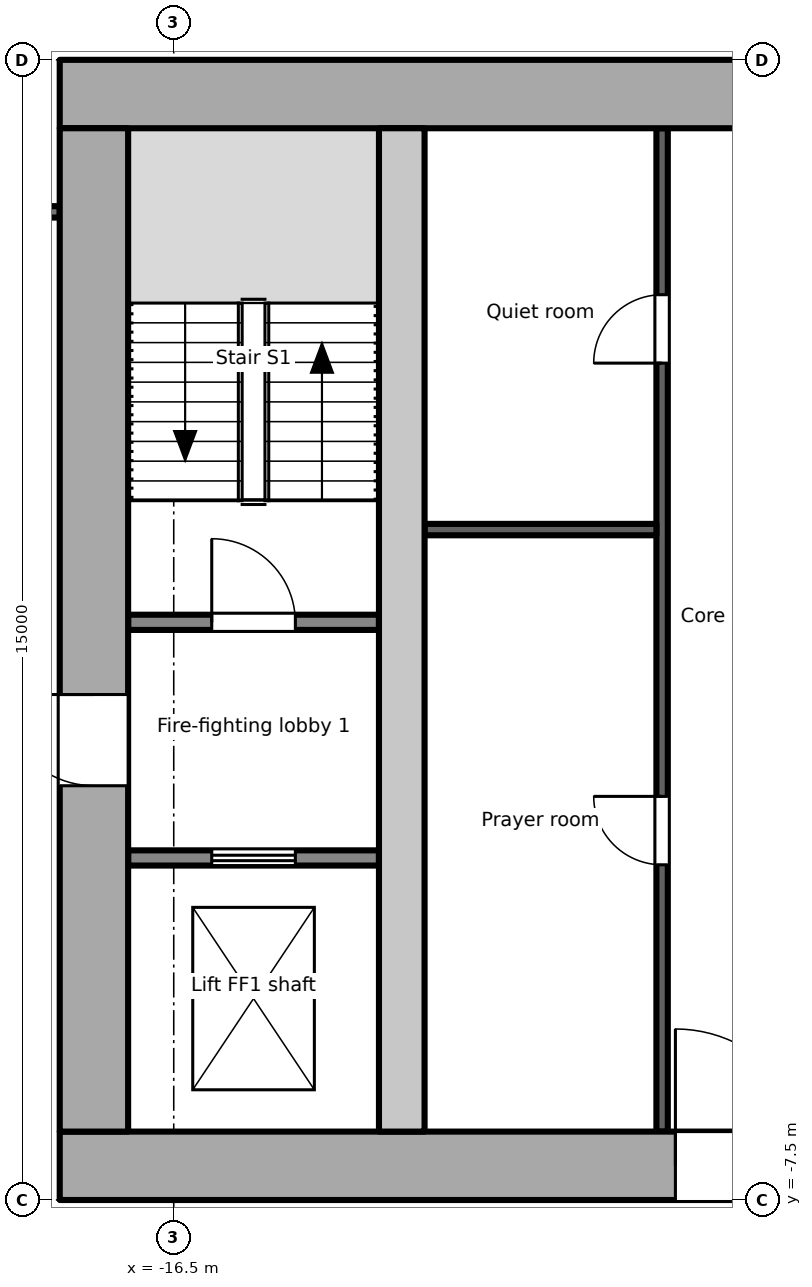
"""IFC4 building model, lengths in metres.
Left out: names, types, materials, properties, quantities, classifications, styles, units other than length and angle.
Written with IfcOpenShell. Run it as: python <this file> out.ifc"""

import sys

from ifc_helpers import new_model, si_unit, direction, frame, frame_2d, origin, place, context, subcontext, project, spatial, rectangle, extrude, element, fill, save


model = new_model("IFC4")
c1 = context("Model", 3, precision=1e-05, world=origin(), true_north=direction((0.0, 1.0)))
c2 = subcontext(c1, "Body", "Model", "MODEL_VIEW")
j1 = project(units=[si_unit("LENGTHUNIT", "METRE"), si_unit("PLANEANGLEUNIT", "RADIAN")], contexts=[c1])
p1 = place(None, origin())
s1 = spatial("IfcSite", under=j1, at=p1, CompositionType="ELEMENT")
p2 = place(p1, origin())
s2 = spatial("IfcBuilding", under=s1, at=p2, CompositionType="ELEMENT")
p3 = place(p2, frame((0.0, 0.0, 282.4)))
s3 = spatial("IfcBuildingStorey", under=s2, at=p3, CompositionType="ELEMENT", Elevation=282.4)
p4 = place(p3, frame((-18.0, -7.05, -0.2), z_axis=(0.0, 0.0, 1.0), x_axis=(1.0, 0.0, 0.0)))
e1 = element("IfcWall", 1, at=p4, inside=s3, PredefinedType="SHEAR", context=c2, shape_type="SweptSolid", body=[
    extrude(rectangle(XDim=36.0, YDim=0.9, at=frame_2d((18.0, 0.0))), origin(), (0.0, 0.0, 1.0), 3.9),
])
p5 = place(p4, frame((8.1, 0.0, 0.2)))
e2 = element("IfcOpeningElement", 2, at=p5, cuts=e1, PredefinedType="OPENING", context=c2, shape_type="SweptSolid", body=[
    extrude(rectangle(XDim=1.8, YDim=2.1, at=frame_2d((0.9, 1.05))), frame((0.0, 0.46, 0.0), z_axis=(0.0, -1.0, 0.0), x_axis=(1.0, 0.0, 0.0)), (0.0, 0.0, 1.0), 0.921),
])
p6 = place(p4, frame((16.8, 0.0, 0.2)))
e3 = element("IfcOpeningElement", 3, at=p6, cuts=e1, PredefinedType="OPENING", context=c2, shape_type="SweptSolid", body=[
    extrude(rectangle(XDim=2.4, YDim=2.1, at=frame_2d((1.2, 1.05))), frame((0.0, 0.46, 0.0), z_axis=(0.0, -1.0, 0.0), x_axis=(1.0, 0.0, 0.0)), (0.0, 0.0, 1.0), 0.921),
])
p7 = place(p4, frame((26.1, 0.0, 0.2)))
e4 = element("IfcOpeningElement", 4, at=p7, cuts=e1, PredefinedType="OPENING", context=c2, shape_type="SweptSolid", body=[
    extrude(rectangle(XDim=2.4, YDim=2.1, at=frame_2d((1.2, 1.05))), frame((0.0, 0.46, 0.0), z_axis=(0.0, -1.0, 0.0), x_axis=(1.0, 0.0, 0.0)), (0.0, 0.0, 1.0), 0.921),
])
p8 = place(p3, frame((-18.0, 7.05, -0.2), z_axis=(0.0, 0.0, 1.0), x_axis=(1.0, 0.0, 0.0)))
e5 = element("IfcWall", 5, at=p8, inside=s3, PredefinedType="SHEAR", context=c2, shape_type="SweptSolid", body=[
    extrude(rectangle(XDim=36.0, YDim=0.9, at=frame_2d((18.0, 0.0))), origin(), (0.0, 0.0, 1.0), 3.9),
])
p9 = place(p3, frame((-17.55, -6.6, -0.2), z_axis=(0.0, 0.0, 1.0), x_axis=(0.0, 1.0, 0.0)))
e6 = element("IfcWall", 6, at=p9, inside=s3, PredefinedType="SHEAR", context=c2, shape_type="SweptSolid", body=[
    extrude(rectangle(XDim=13.2, YDim=0.9, at=frame_2d((6.6, 0.0))), origin(), (0.0, 0.0, 1.0), 3.9),
])
p10 = place(p9, frame((4.55, 0.0, 0.2)))
e7 = element("IfcOpeningElement", 7, at=p10, cuts=e6, PredefinedType="OPENING", context=c2, shape_type="SweptSolid", body=[
    extrude(rectangle(XDim=1.2, YDim=2.1, at=frame_2d((0.6, 1.05))), frame((0.0, 0.46, 0.0), z_axis=(0.0, -1.0, 0.0), x_axis=(1.0, 0.0, 0.0)), (0.0, 0.0, 1.0), 0.921),
])
p11 = place(p3, frame((-13.5, -6.6, -0.2), z_axis=(0.0, 0.0, 1.0), x_axis=(0.0, 1.0, 0.0)))
e8 = element("IfcWall", 8, at=p11, inside=s3, PredefinedType="SHEAR", context=c2, shape_type="SweptSolid", body=[
    extrude(rectangle(XDim=13.2, YDim=0.6, at=frame_2d((6.6, 0.0))), origin(), (0.0, 0.0, 1.0), 3.9),
])
p12 = place(p3, frame((-17.1, -3.0, 0.0), z_axis=(0.0, 0.0, 1.0), x_axis=(1.0, 0.0, 0.0)))
e9 = element("IfcWall", 9, at=p12, inside=s3, PredefinedType="PARTITIONING", context=c2, shape_type="SweptSolid", body=[
    extrude(rectangle(XDim=3.3, YDim=0.2, at=frame_2d((1.65, 0.0))), origin(), (0.0, 0.0, 1.0), 3.7),
])
p13 = place(p12, frame((1.1, 0.0, 0.0)))
e10 = element("IfcOpeningElement", 10, at=p13, cuts=e9, PredefinedType="OPENING", context=c2, shape_type="SweptSolid", body=[
    extrude(rectangle(XDim=1.1, YDim=2.1, at=frame_2d((0.55, 1.05))), frame((0.0, 0.111, 0.0), z_axis=(0.0, -1.0, 0.0), x_axis=(1.0, 0.0, 0.0)), (0.0, 0.0, 1.0), 0.221),
])
p14 = place(p3, frame((-17.1, 0.1, 0.0), z_axis=(0.0, 0.0, 1.0), x_axis=(1.0, 0.0, 0.0)))
e11 = element("IfcWall", 11, at=p14, inside=s3, PredefinedType="PARTITIONING", context=c2, shape_type="SweptSolid", body=[
    extrude(rectangle(XDim=3.3, YDim=0.2, at=frame_2d((1.65, 0.0))), origin(), (0.0, 0.0, 1.0), 3.7),
])
p15 = place(p14, frame((1.1, 0.0, 0.0)))
e12 = element("IfcOpeningElement", 12, at=p15, cuts=e11, PredefinedType="OPENING", context=c2, shape_type="SweptSolid", body=[
    extrude(rectangle(XDim=1.1, YDim=2.1, at=frame_2d((0.55, 1.05))), frame((0.0, 0.111, 0.0), z_axis=(0.0, -1.0, 0.0), x_axis=(1.0, 0.0, 0.0)), (0.0, 0.0, 1.0), 0.221),
])
p16 = place(p3, frame((-10.075, -6.6, 0.0), z_axis=(0.0, 0.0, 1.0), x_axis=(0.0, 1.0, 0.0)))
e13 = element("IfcWall", 13, at=p16, inside=s3, PredefinedType="PARTITIONING", context=c2, shape_type="SweptSolid", body=[
    extrude(rectangle(XDim=13.2, YDim=0.15, at=frame_2d((6.6, 0.0))), origin(), (0.0, 0.0, 1.0), 3.7),
])
p17 = place(p16, frame((3.51, 0.0, 0.0)))
e14 = element("IfcOpeningElement", 14, at=p17, cuts=e13, PredefinedType="OPENING", context=c2, shape_type="SweptSolid", body=[
    extrude(rectangle(XDim=0.9, YDim=2.1, at=frame_2d((0.45, 1.05))), frame((0.0, 0.085, 0.0), z_axis=(0.0, -1.0, 0.0), x_axis=(1.0, 0.0, 0.0)), (0.0, 0.0, 1.0), 0.171),
])
p18 = place(p16, frame((10.11, 0.0, 0.0)))
e15 = element("IfcOpeningElement", 15, at=p18, cuts=e13, PredefinedType="OPENING", context=c2, shape_type="SweptSolid", body=[
    extrude(rectangle(XDim=0.9, YDim=2.1, at=frame_2d((0.45, 1.05))), frame((0.0, 0.085, 0.0), z_axis=(0.0, -1.0, 0.0), x_axis=(1.0, 0.0, 0.0)), (0.0, 0.0, 1.0), 0.171),
])
p19 = place(p3, frame((-13.2, 1.32, 0.0), z_axis=(0.0, 0.0, 1.0), x_axis=(1.0, 0.0, 0.0)))
e16 = element("IfcWall", 16, at=p19, inside=s3, PredefinedType="PARTITIONING", context=c2, shape_type="SweptSolid", body=[
    extrude(rectangle(XDim=3.05, YDim=0.15, at=frame_2d((1.525, 0.0))), origin(), (0.0, 0.0, 1.0), 3.7),
])
p20 = place(p3, frame((-20.925, 5.5, 0.0), z_axis=(0.0, 0.0, 1.0), x_axis=(1.0, 0.0, 0.0)))
e17 = element("IfcWall", 17, at=p20, inside=s3, PredefinedType="PARTITIONING", context=c2, shape_type="SweptSolid", body=[
    extrude(rectangle(XDim=2.925, YDim=0.15, at=frame_2d((1.462, 0.0))), origin(), (0.0, 0.0, 1.0), 3.7),
])
p21 = place(p13, origin())
e18 = element("IfcDoor", 18, at=p21, inside=s3, OperationType="DOUBLE_DOOR_SLIDING", PredefinedType="DOOR", context=c2, shape_type="SweptSolid", body=[
    extrude(rectangle(XDim=1.1, YDim=2.1, at=frame_2d((0.55, 1.05))), frame((0.0, 0.025, 0.0), z_axis=(0.0, -1.0, 0.0), x_axis=(1.0, 0.0, 0.0)), (0.0, 0.0, 1.0), 0.05),
])
fill(e10, e18)
p22 = place(p10, origin())
e19 = element("IfcDoor", 19, at=p22, inside=s3, OperationType="SINGLE_SWING_RIGHT", PredefinedType="DOOR", context=c2, shape_type="SweptSolid", body=[
    extrude(rectangle(XDim=1.2, YDim=2.1, at=frame_2d((0.6, 1.05))), frame((0.0, 0.025, 0.0), z_axis=(0.0, -1.0, 0.0), x_axis=(1.0, 0.0, 0.0)), (0.0, 0.0, 1.0), 0.05),
])
fill(e7, e19)
p23 = place(p15, origin())
e20 = element("IfcDoor", 20, at=p23, inside=s3, OperationType="SINGLE_SWING_LEFT", PredefinedType="DOOR", context=c2, shape_type="SweptSolid", body=[
    extrude(rectangle(XDim=1.1, YDim=2.1, at=frame_2d((0.55, 1.05))), frame((0.0, 0.025, 0.0), z_axis=(0.0, -1.0, 0.0), x_axis=(1.0, 0.0, 0.0)), (0.0, 0.0, 1.0), 0.05),
])
fill(e12, e20)
p24 = place(p17, origin())
e21 = element("IfcDoor", 21, at=p24, inside=s3, OperationType="SINGLE_SWING_RIGHT", PredefinedType="DOOR", context=c2, shape_type="SweptSolid", body=[
    extrude(rectangle(XDim=0.9, YDim=2.1, at=frame_2d((0.45, 1.05))), frame((0.0, 0.025, 0.0), z_axis=(0.0, -1.0, 0.0), x_axis=(1.0, 0.0, 0.0)), (0.0, 0.0, 1.0), 0.05),
])
fill(e14, e21)
p25 = place(p18, origin())
e22 = element("IfcDoor", 22, at=p25, inside=s3, OperationType="SINGLE_SWING_LEFT", PredefinedType="DOOR", context=c2, shape_type="SweptSolid", body=[
    extrude(rectangle(XDim=0.9, YDim=2.1, at=frame_2d((0.45, 1.05))), frame((0.0, 0.025, 0.0), z_axis=(0.0, -1.0, 0.0), x_axis=(1.0, 0.0, 0.0)), (0.0, 0.0, 1.0), 0.05),
])
fill(e15, e22)
p26 = place(p5, origin())
e23 = element("IfcDoor", 23, at=p26, inside=s3, OperationType="SINGLE_SWING_LEFT", PredefinedType="DOOR", context=c2, shape_type="SweptSolid", body=[
    extrude(rectangle(XDim=1.8, YDim=2.1, at=frame_2d((0.9, 1.05))), frame((0.0, 0.025, 0.0), z_axis=(0.0, -1.0, 0.0), x_axis=(1.0, 0.0, 0.0)), (0.0, 0.0, 1.0), 0.05),
])
fill(e2, e23)
save(model, sys.argv[1])
